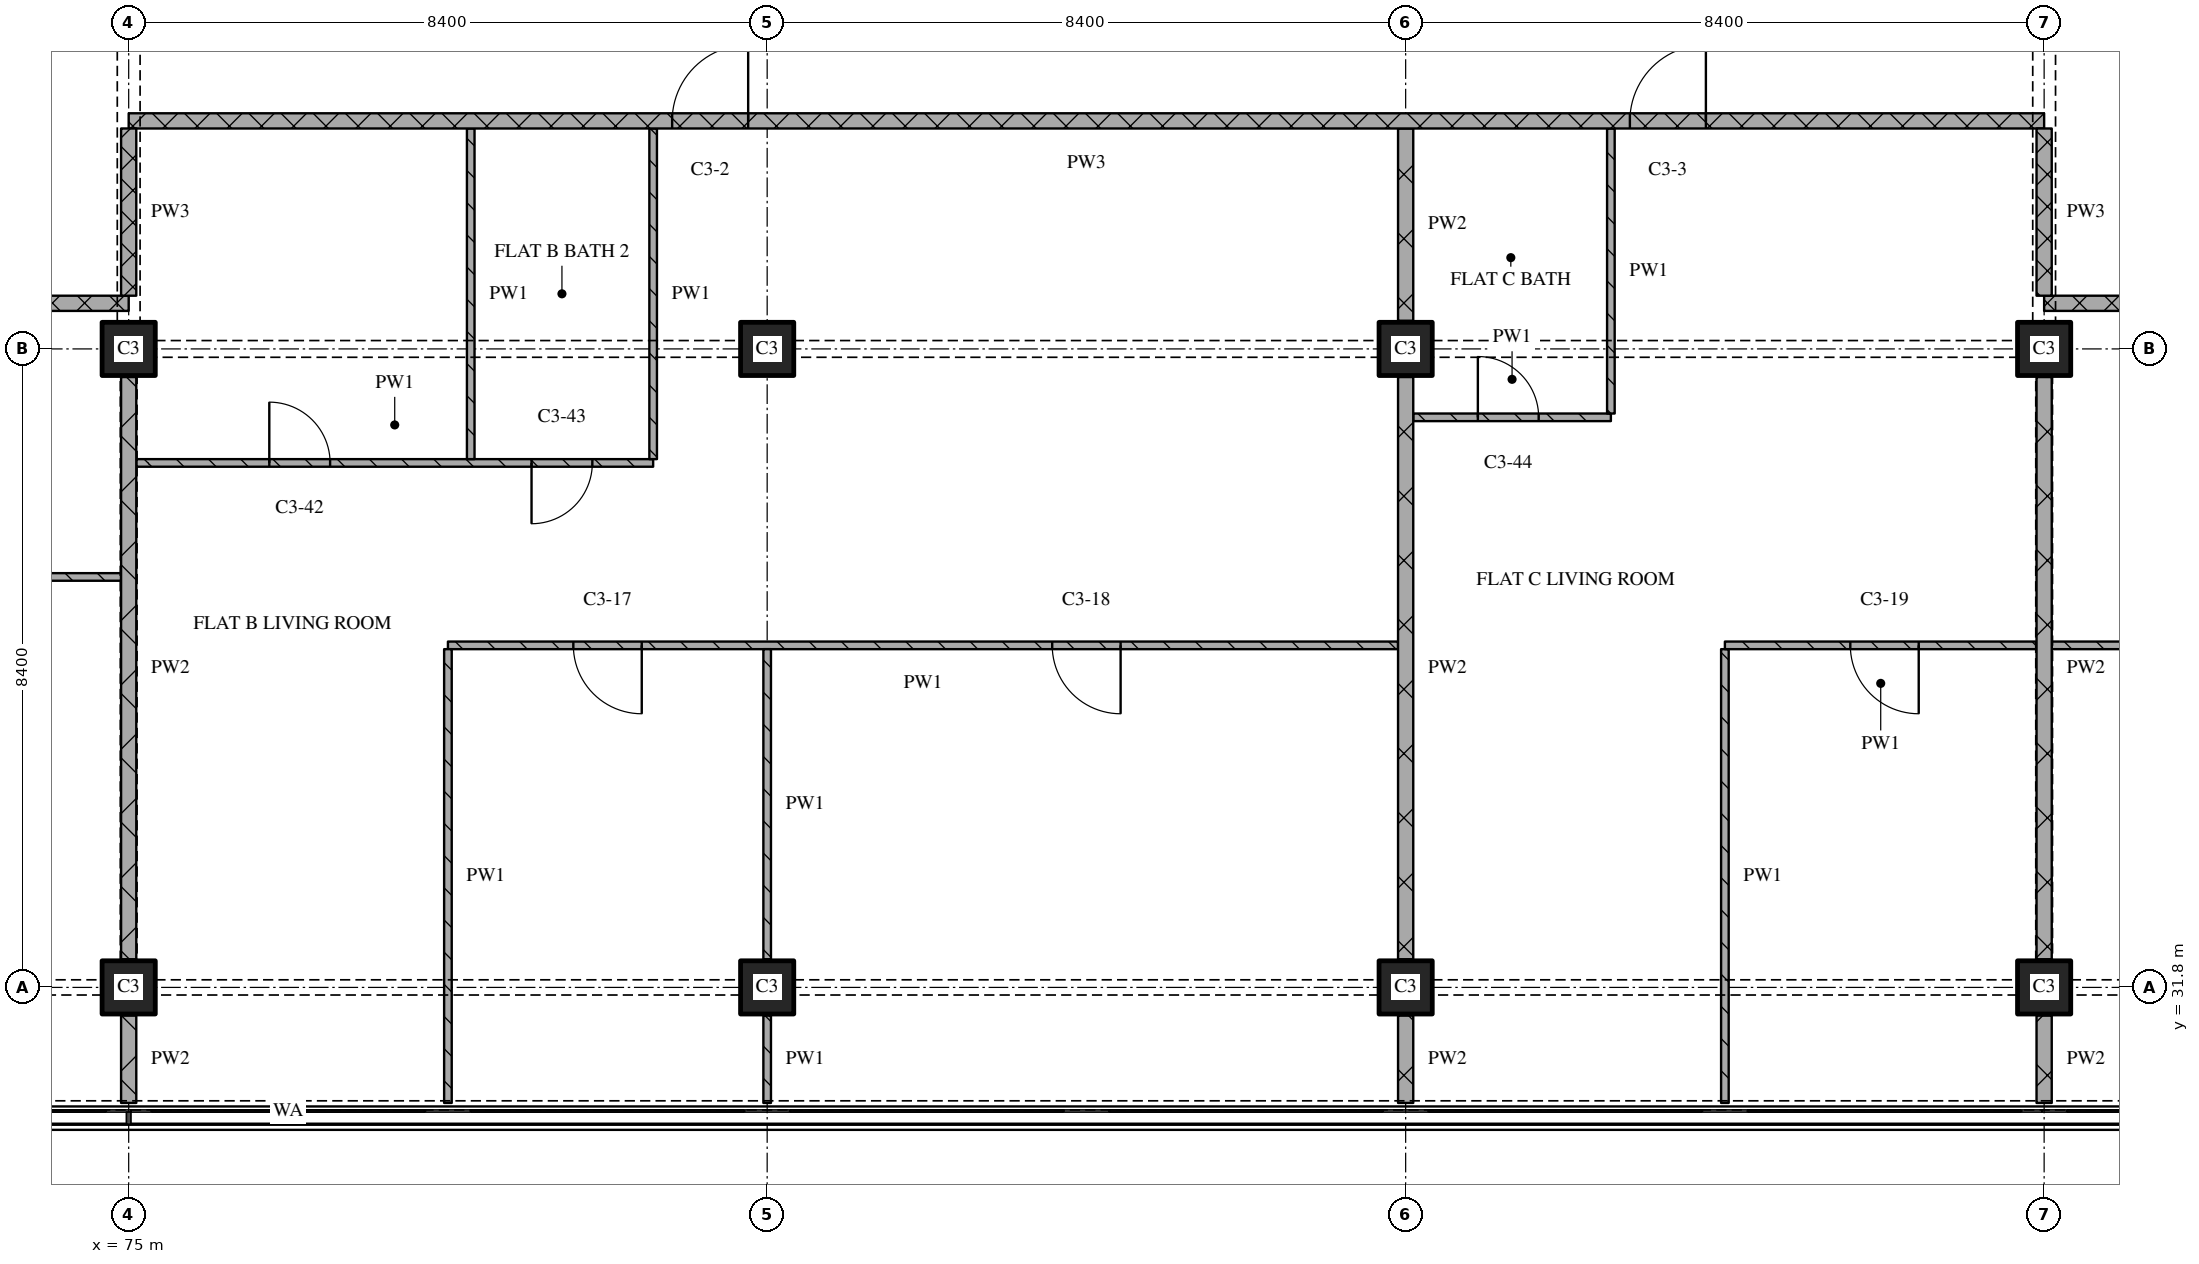
"""IFC4 building model, lengths in metres.
Left out: names, types, materials, properties, quantities, classifications, styles, units other than length and angle.
Written with IfcOpenShell. Run it as: python <this file> out.ifc"""

import sys

from ifc_helpers import new_model, si_unit, direction, frame, frame_2d, origin, origin_2d, place, context, subcontext, project, spatial, rectangle, extrude, element, fill, save


model = new_model("IFC4")
c1 = context("Model", 3, precision=1e-05, world=origin(), true_north=direction((0.0, 1.0)))
c2 = subcontext(c1, "Body", "Model", "MODEL_VIEW")
j1 = project(units=[si_unit("LENGTHUNIT", "METRE"), si_unit("PLANEANGLEUNIT", "RADIAN")], contexts=[c1])
p1 = place(None, origin())
s1 = spatial("IfcSite", under=j1, at=p1, CompositionType="ELEMENT")
p2 = place(p1, origin())
s2 = spatial("IfcBuilding", under=s1, at=p2, CompositionType="ELEMENT")
p3 = place(p2, frame((0.0, 0.0, 169.05)))
s3 = spatial("IfcBuildingStorey", under=s2, at=p3, CompositionType="ELEMENT", Elevation=169.05)
for number, where, z_axis, x_axis in (
    (1, (75.0, 31.8, 0.0), (0.0, 0.0, 1.0), (1.0, 0.0, 0.0)),
    (2, (75.0, 40.2, 0.0), (0.0, 0.0, 1.0), (1.0, 0.0, 0.0)),
    (3, (83.4, 31.8, 0.0), (0.0, 0.0, 1.0), (1.0, 0.0, 0.0)),
    (4, (83.4, 40.2, 0.0), (0.0, 0.0, 1.0), (1.0, 0.0, 0.0)),
    (5, (91.8, 31.8, 0.0), (0.0, 0.0, 1.0), (1.0, 0.0, 0.0)),
    (6, (91.8, 40.2, 0.0), (0.0, 0.0, 1.0), (1.0, 0.0, 0.0)),
    (7, (100.2, 31.8, 0.0), (0.0, 0.0, 1.0), (1.0, 0.0, 0.0)),
    (8, (100.2, 40.2, 0.0), (0.0, 0.0, 1.0), (1.0, 0.0, 0.0)),
):
    element("IfcColumn", number, at=place(p3, frame(where, z_axis=z_axis, x_axis=x_axis)), inside=s3, PredefinedType="COLUMN", context=c2, shape_type="SweptSolid", body=[
        extrude(rectangle(XDim=0.7, YDim=0.7, at=origin_2d()), origin(), (0.0, 0.0, 1.0), 3.6),
    ])
p4 = place(p3, frame((91.7, 36.3, 0.0), z_axis=(0.0, 0.0, 1.0), x_axis=(-1.0, 0.0, 0.0)))
e9 = element("IfcWall", 9, at=p4, inside=s3, PredefinedType="PARTITIONING", context=c2, shape_type="SweptSolid", body=[
    extrude(rectangle(XDim=12.5, YDim=0.1, at=frame_2d((6.25, 0.0))), origin(), (0.0, 0.0, 1.0), 3.32),
])
p5 = place(p4, frame((3.65, 0.0, 0.0)))
e10 = element("IfcOpeningElement", 10, at=p5, cuts=e9, PredefinedType="OPENING", context=c2, shape_type="SweptSolid", body=[
    extrude(rectangle(XDim=0.9, YDim=2.1, at=frame_2d((0.45, 1.05))), frame((0.0, 0.06, 0.0), z_axis=(0.0, -1.0, 0.0), x_axis=(1.0, 0.0, 0.0)), (0.0, 0.0, 1.0), 0.12),
])
p6 = place(p4, frame((9.95, 0.0, 0.0)))
e11 = element("IfcOpeningElement", 11, at=p6, cuts=e9, PredefinedType="OPENING", context=c2, shape_type="SweptSolid", body=[
    extrude(rectangle(XDim=0.9, YDim=2.1, at=frame_2d((0.45, 1.05))), frame((0.0, 0.06, 0.0), z_axis=(0.0, -1.0, 0.0), x_axis=(1.0, 0.0, 0.0)), (0.0, 0.0, 1.0), 0.12),
])
p7 = place(p3, frame((63.0, 37.2, 0.0), z_axis=(0.0, 0.0, 1.0), x_axis=(1.0, 0.0, 0.0)))
e12 = element("IfcWall", 12, at=p7, inside=s3, PredefinedType="PARTITIONING", context=c2, shape_type="SweptSolid", body=[
    extrude(rectangle(XDim=11.9, YDim=0.1, at=frame_2d((5.95, 0.0))), origin(), (0.0, 0.0, 1.0), 3.32),
])
p8 = place(p7, frame((6.35, 0.0, 0.0)))
e13 = element("IfcOpeningElement", 13, at=p8, cuts=e12, PredefinedType="OPENING", context=c2, shape_type="SweptSolid", body=[
    extrude(rectangle(XDim=0.8, YDim=2.1, at=frame_2d((0.4, 1.05))), frame((0.0, 0.06, 0.0), z_axis=(0.0, -1.0, 0.0), x_axis=(1.0, 0.0, 0.0)), (0.0, 0.0, 1.0), 0.12),
])
p9 = place(p7, frame((10.05, 0.0, 0.0)))
e14 = element("IfcOpeningElement", 14, at=p9, cuts=e12, PredefinedType="OPENING", context=c2, shape_type="SweptSolid", body=[
    extrude(rectangle(XDim=0.9, YDim=2.1, at=frame_2d((0.45, 1.05))), frame((0.0, 0.06, 0.0), z_axis=(0.0, -1.0, 0.0), x_axis=(1.0, 0.0, 0.0)), (0.0, 0.0, 1.0), 0.12),
])
p10 = place(p3, frame((75.1, 38.7, 0.0), z_axis=(0.0, 0.0, 1.0), x_axis=(1.0, 0.0, 0.0)))
e15 = element("IfcWall", 15, at=p10, inside=s3, PredefinedType="PARTITIONING", context=c2, shape_type="SweptSolid", body=[
    extrude(rectangle(XDim=6.8, YDim=0.1, at=frame_2d((3.4, 0.0))), origin(), (0.0, 0.0, 1.0), 3.32),
])
p11 = place(p10, frame((1.75, 0.0, 0.0)))
e16 = element("IfcOpeningElement", 16, at=p11, cuts=e15, PredefinedType="OPENING", context=c2, shape_type="SweptSolid", body=[
    extrude(rectangle(XDim=0.8, YDim=2.1, at=frame_2d((0.4, 1.05))), frame((0.0, 0.06, 0.0), z_axis=(0.0, -1.0, 0.0), x_axis=(1.0, 0.0, 0.0)), (0.0, 0.0, 1.0), 0.12),
])
p12 = place(p10, frame((5.2, 0.0, 0.0)))
e17 = element("IfcOpeningElement", 17, at=p12, cuts=e15, PredefinedType="OPENING", context=c2, shape_type="SweptSolid", body=[
    extrude(rectangle(XDim=0.8, YDim=2.1, at=frame_2d((0.4, 1.05))), frame((0.0, 0.06, 0.0), z_axis=(0.0, -1.0, 0.0), x_axis=(1.0, 0.0, 0.0)), (0.0, 0.0, 1.0), 0.12),
])
p13 = place(p3, frame((91.9, 39.3, 0.0), z_axis=(0.0, 0.0, 1.0), x_axis=(1.0, 0.0, 0.0)))
e18 = element("IfcWall", 18, at=p13, inside=s3, PredefinedType="PARTITIONING", context=c2, shape_type="SweptSolid", body=[
    extrude(rectangle(XDim=2.6, YDim=0.1, at=frame_2d((1.3, 0.0))), origin(), (0.0, 0.0, 1.0), 3.32),
])
p14 = place(p13, frame((0.85, 0.0, 0.0)))
e19 = element("IfcOpeningElement", 19, at=p14, cuts=e18, PredefinedType="OPENING", context=c2, shape_type="SweptSolid", body=[
    extrude(rectangle(XDim=0.8, YDim=2.1, at=frame_2d((0.4, 1.05))), frame((0.0, 0.06, 0.0), z_axis=(0.0, -1.0, 0.0), x_axis=(1.0, 0.0, 0.0)), (0.0, 0.0, 1.0), 0.12),
])
p15 = place(p3, frame((75.0, 40.8, 0.0), z_axis=(0.0, 0.0, 1.0), x_axis=(-1.0, 0.0, 0.0)))
e20 = element("IfcWall", 20, at=p15, inside=s3, PredefinedType="PARTITIONING", context=c2, shape_type="SweptSolid", body=[
    extrude(rectangle(XDim=24.28, YDim=0.2, at=frame_2d((12.14, 0.0))), origin(), (0.0, 0.0, 1.0), 3.32),
])
p16 = place(p15, frame((12.25, 0.0, 0.0)))
e21 = element("IfcOpeningElement", 21, at=p16, cuts=e20, PredefinedType="OPENING", context=c2, shape_type="SweptSolid", body=[
    extrude(rectangle(XDim=1.0, YDim=2.1, at=frame_2d((0.5, 1.05))), frame((0.0, 0.11, 0.0), z_axis=(0.0, -1.0, 0.0), x_axis=(1.0, 0.0, 0.0)), (0.0, 0.0, 1.0), 0.22),
])
p17 = place(p3, frame((124.48, 40.8, 0.0), z_axis=(0.0, 0.0, 1.0), x_axis=(-1.0, 0.0, 0.0)))
e22 = element("IfcWall", 22, at=p17, inside=s3, PredefinedType="PARTITIONING", context=c2, shape_type="SweptSolid", body=[
    extrude(rectangle(XDim=24.28, YDim=0.2, at=frame_2d((12.14, 0.0))), origin(), (0.0, 0.0, 1.0), 3.32),
])
p18 = place(p17, frame((11.93, 0.0, 0.0)))
e23 = element("IfcOpeningElement", 23, at=p18, cuts=e22, PredefinedType="OPENING", context=c2, shape_type="SweptSolid", body=[
    extrude(rectangle(XDim=1.0, YDim=2.1, at=frame_2d((0.5, 1.05))), frame((0.0, 0.11, 0.0), z_axis=(0.0, -1.0, 0.0), x_axis=(1.0, 0.0, 0.0)), (0.0, 0.0, 1.0), 0.22),
])
p19 = place(p3, frame((100.2, 43.2, 0.0), z_axis=(0.0, 0.0, 1.0), x_axis=(-1.0, 0.0, 0.0)))
e24 = element("IfcWall", 24, at=p19, inside=s3, PredefinedType="PARTITIONING", context=c2, shape_type="SweptSolid", body=[
    extrude(rectangle(XDim=25.2, YDim=0.2, at=frame_2d((12.6, 0.0))), origin(), (0.0, 0.0, 1.0), 3.32),
])
p20 = place(p19, frame((4.45, 0.0, 0.0)))
e25 = element("IfcOpeningElement", 25, at=p20, cuts=e24, PredefinedType="OPENING", context=c2, shape_type="SweptSolid", body=[
    extrude(rectangle(XDim=1.0, YDim=2.1, at=frame_2d((0.5, 1.05))), frame((0.0, 0.11, 0.0), z_axis=(0.0, -1.0, 0.0), x_axis=(1.0, 0.0, 0.0)), (0.0, 0.0, 1.0), 0.22),
])
p21 = place(p19, frame((17.05, 0.0, 0.0)))
e26 = element("IfcOpeningElement", 26, at=p21, cuts=e24, PredefinedType="OPENING", context=c2, shape_type="SweptSolid", body=[
    extrude(rectangle(XDim=1.0, YDim=2.1, at=frame_2d((0.5, 1.05))), frame((0.0, 0.11, 0.0), z_axis=(0.0, -1.0, 0.0), x_axis=(1.0, 0.0, 0.0)), (0.0, 0.0, 1.0), 0.22),
])
p22 = place(p3, frame((75.0, 43.1, 0.0), z_axis=(0.0, 0.0, 1.0), x_axis=(0.0, -1.0, 0.0)))
e27 = element("IfcWall", 27, at=p22, inside=s3, PredefinedType="PARTITIONING", context=c2, shape_type="SweptSolid", body=[
    extrude(rectangle(XDim=2.2, YDim=0.2, at=frame_2d((1.1, 0.0))), origin(), (0.0, 0.0, 1.0), 2.43),
])
p23 = place(p3, frame((75.0, 31.43, 0.0), z_axis=(0.0, 0.0, 1.0), x_axis=(0.0, -1.0, 0.0)))
e28 = element("IfcWall", 28, at=p23, inside=s3, PredefinedType="PARTITIONING", context=c2, shape_type="SweptSolid", body=[
    extrude(rectangle(XDim=1.15, YDim=0.2, at=frame_2d((0.575, 0.0))), origin(), (0.0, 0.0, 1.0), 3.32),
])
p24 = place(p3, frame((75.0, 39.83, 0.0), z_axis=(0.0, 0.0, 1.0), x_axis=(0.0, -1.0, 0.0)))
e29 = element("IfcWall", 29, at=p24, inside=s3, PredefinedType="PARTITIONING", context=c2, shape_type="SweptSolid", body=[
    extrude(rectangle(XDim=7.66, YDim=0.2, at=frame_2d((3.83, 0.0))), origin(), (0.0, 0.0, 1.0), 2.72),
])
p25 = place(p3, frame((79.2, 36.25, 0.0), z_axis=(0.0, 0.0, 1.0), x_axis=(0.0, -1.0, 0.0)))
e30 = element("IfcWall", 30, at=p25, inside=s3, PredefinedType="PARTITIONING", context=c2, shape_type="SweptSolid", body=[
    extrude(rectangle(XDim=5.97, YDim=0.1, at=frame_2d((2.985, 0.0))), origin(), (0.0, 0.0, 1.0), 3.32),
])
for number, where, z_axis, x_axis in (
    (31, (79.5, 43.1, 0.0), (0.0, 0.0, 1.0), (0.0, -1.0, 0.0)),
    (32, (81.9, 43.1, 0.0), (0.0, 0.0, 1.0), (0.0, -1.0, 0.0)),
):
    element("IfcWall", number, at=place(p3, frame(where, z_axis=z_axis, x_axis=x_axis)), inside=s3, PredefinedType="PARTITIONING", context=c2, shape_type="SweptSolid", body=[
        extrude(rectangle(XDim=4.35, YDim=0.1, at=frame_2d((2.175, 0.0))), origin(), (0.0, 0.0, 1.0), 3.32),
    ])
p26 = place(p3, frame((83.4, 31.43, 0.0), z_axis=(0.0, 0.0, 1.0), x_axis=(0.0, -1.0, 0.0)))
e33 = element("IfcWall", 33, at=p26, inside=s3, PredefinedType="PARTITIONING", context=c2, shape_type="SweptSolid", body=[
    extrude(rectangle(XDim=1.15, YDim=0.1, at=frame_2d((0.575, 0.0))), origin(), (0.0, 0.0, 1.0), 3.32),
])
p27 = place(p3, frame((83.4, 36.25, 0.0), z_axis=(0.0, 0.0, 1.0), x_axis=(0.0, -1.0, 0.0)))
e34 = element("IfcWall", 34, at=p27, inside=s3, PredefinedType="PARTITIONING", context=c2, shape_type="SweptSolid", body=[
    extrude(rectangle(XDim=4.08, YDim=0.1, at=frame_2d((2.04, 0.0))), origin(), (0.0, 0.0, 1.0), 3.32),
])
p28 = place(p3, frame((91.8, 31.43, 0.0), z_axis=(0.0, 0.0, 1.0), x_axis=(0.0, -1.0, 0.0)))
e35 = element("IfcWall", 35, at=p28, inside=s3, PredefinedType="PARTITIONING", context=c2, shape_type="SweptSolid", body=[
    extrude(rectangle(XDim=1.15, YDim=0.2, at=frame_2d((0.575, 0.0))), origin(), (0.0, 0.0, 1.0), 3.32),
])
p29 = place(p3, frame((91.8, 39.83, 0.0), z_axis=(0.0, 0.0, 1.0), x_axis=(0.0, -1.0, 0.0)))
e36 = element("IfcWall", 36, at=p29, inside=s3, PredefinedType="PARTITIONING", context=c2, shape_type="SweptSolid", body=[
    extrude(rectangle(XDim=7.66, YDim=0.2, at=frame_2d((3.83, 0.0))), origin(), (0.0, 0.0, 1.0), 3.32),
])
p30 = place(p3, frame((91.8, 43.1, 0.0), z_axis=(0.0, 0.0, 1.0), x_axis=(0.0, -1.0, 0.0)))
e37 = element("IfcWall", 37, at=p30, inside=s3, PredefinedType="PARTITIONING", context=c2, shape_type="SweptSolid", body=[
    extrude(rectangle(XDim=2.53, YDim=0.2, at=frame_2d((1.265, 0.0))), origin(), (0.0, 0.0, 1.0), 3.32),
])
p31 = place(p3, frame((94.5, 43.1, 0.0), z_axis=(0.0, 0.0, 1.0), x_axis=(0.0, -1.0, 0.0)))
e38 = element("IfcWall", 38, at=p31, inside=s3, PredefinedType="PARTITIONING", context=c2, shape_type="SweptSolid", body=[
    extrude(rectangle(XDim=3.75, YDim=0.1, at=frame_2d((1.875, 0.0))), origin(), (0.0, 0.0, 1.0), 3.32),
])
p32 = place(p3, frame((96.0, 36.25, 0.0), z_axis=(0.0, 0.0, 1.0), x_axis=(0.0, -1.0, 0.0)))
e39 = element("IfcWall", 39, at=p32, inside=s3, PredefinedType="PARTITIONING", context=c2, shape_type="SweptSolid", body=[
    extrude(rectangle(XDim=5.97, YDim=0.1, at=frame_2d((2.985, 0.0))), origin(), (0.0, 0.0, 1.0), 3.32),
])
p33 = place(p3, frame((100.2, 43.1, 0.0), z_axis=(0.0, 0.0, 1.0), x_axis=(0.0, -1.0, 0.0)))
e40 = element("IfcWall", 40, at=p33, inside=s3, PredefinedType="PARTITIONING", context=c2, shape_type="SweptSolid", body=[
    extrude(rectangle(XDim=2.2, YDim=0.2, at=frame_2d((1.1, 0.0))), origin(), (0.0, 0.0, 1.0), 2.43),
])
p34 = place(p3, frame((100.2, 31.43, 0.0), z_axis=(0.0, 0.0, 1.0), x_axis=(0.0, -1.0, 0.0)))
e41 = element("IfcWall", 41, at=p34, inside=s3, PredefinedType="PARTITIONING", context=c2, shape_type="SweptSolid", body=[
    extrude(rectangle(XDim=1.15, YDim=0.2, at=frame_2d((0.575, 0.0))), origin(), (0.0, 0.0, 1.0), 3.32),
])
p35 = place(p3, frame((100.2, 39.83, 0.0), z_axis=(0.0, 0.0, 1.0), x_axis=(0.0, -1.0, 0.0)))
e42 = element("IfcWall", 42, at=p35, inside=s3, PredefinedType="PARTITIONING", context=c2, shape_type="SweptSolid", body=[
    extrude(rectangle(XDim=7.66, YDim=0.2, at=frame_2d((3.83, 0.0))), origin(), (0.0, 0.0, 1.0), 2.72),
])
p36 = place(p3, frame((100.1, 36.3, 0.0), z_axis=(0.0, 0.0, 1.0), x_axis=(-1.0, 0.0, 0.0)))
e43 = element("IfcWall", 43, at=p36, inside=s3, PredefinedType="PARTITIONING", context=c2, shape_type="SweptSolid", body=[
    extrude(rectangle(XDim=4.1, YDim=0.1, at=frame_2d((2.05, 0.0))), origin(), (0.0, 0.0, 1.0), 3.32),
])
p37 = place(p36, frame((1.55, 0.0, 0.0)))
e44 = element("IfcOpeningElement", 44, at=p37, cuts=e43, PredefinedType="OPENING", context=c2, shape_type="SweptSolid", body=[
    extrude(rectangle(XDim=0.9, YDim=2.1, at=frame_2d((0.45, 1.05))), frame((0.0, 0.06, 0.0), z_axis=(0.0, -1.0, 0.0), x_axis=(1.0, 0.0, 0.0)), (0.0, 0.0, 1.0), 0.12),
])
p38 = place(p3, frame((100.3, 36.3, 0.0), z_axis=(0.0, 0.0, 1.0), x_axis=(1.0, 0.0, 0.0)))
e45 = element("IfcWall", 45, at=p38, inside=s3, PredefinedType="PARTITIONING", context=c2, shape_type="SweptSolid", body=[
    extrude(rectangle(XDim=11.0, YDim=0.1, at=frame_2d((5.5, 0.0))), origin(), (0.0, 0.0, 1.0), 3.32),
])
p39 = place(p38, frame((1.75, 0.0, 0.0)))
e46 = element("IfcOpeningElement", 46, at=p39, cuts=e45, PredefinedType="OPENING", context=c2, shape_type="SweptSolid", body=[
    extrude(rectangle(XDim=0.8, YDim=2.1, at=frame_2d((0.4, 1.05))), frame((0.0, 0.06, 0.0), z_axis=(0.0, -1.0, 0.0), x_axis=(1.0, 0.0, 0.0)), (0.0, 0.0, 1.0), 0.12),
])
p40 = place(p38, frame((6.25, 0.0, 0.0)))
e47 = element("IfcOpeningElement", 47, at=p40, cuts=e45, PredefinedType="OPENING", context=c2, shape_type="SweptSolid", body=[
    extrude(rectangle(XDim=0.8, YDim=2.1, at=frame_2d((0.4, 1.05))), frame((0.0, 0.06, 0.0), z_axis=(0.0, -1.0, 0.0), x_axis=(1.0, 0.0, 0.0)), (0.0, 0.0, 1.0), 0.12),
])
p41 = place(p38, frame((9.5, 0.0, 0.0)))
e48 = element("IfcOpeningElement", 48, at=p41, cuts=e45, PredefinedType="OPENING", context=c2, shape_type="SweptSolid", body=[
    extrude(rectangle(XDim=0.9, YDim=2.1, at=frame_2d((0.45, 1.05))), frame((0.0, 0.06, 0.0), z_axis=(0.0, -1.0, 0.0), x_axis=(1.0, 0.0, 0.0)), (0.0, 0.0, 1.0), 0.12),
])
p42 = place(p5, origin())
e49 = element("IfcDoor", 49, at=p42, inside=s3, OperationType="SINGLE_SWING_LEFT", PredefinedType="DOOR", context=c2, shape_type="SweptSolid", body=[
    extrude(rectangle(XDim=0.9, YDim=2.1, at=frame_2d((0.45, 1.05))), frame((0.0, 0.025, 0.0), z_axis=(0.0, -1.0, 0.0), x_axis=(1.0, 0.0, 0.0)), (0.0, 0.0, 1.0), 0.05),
])
fill(e10, e49)
p43 = place(p6, origin())
e50 = element("IfcDoor", 50, at=p43, inside=s3, OperationType="SINGLE_SWING_LEFT", PredefinedType="DOOR", context=c2, shape_type="SweptSolid", body=[
    extrude(rectangle(XDim=0.9, YDim=2.1, at=frame_2d((0.45, 1.05))), frame((0.0, 0.025, 0.0), z_axis=(0.0, -1.0, 0.0), x_axis=(1.0, 0.0, 0.0)), (0.0, 0.0, 1.0), 0.05),
])
fill(e11, e50)
p44 = place(p11, origin())
e51 = element("IfcDoor", 51, at=p44, inside=s3, OperationType="SINGLE_SWING_LEFT", PredefinedType="DOOR", context=c2, shape_type="SweptSolid", body=[
    extrude(rectangle(XDim=0.8, YDim=2.1, at=frame_2d((0.4, 1.05))), frame((0.0, 0.025, 0.0), z_axis=(0.0, -1.0, 0.0), x_axis=(1.0, 0.0, 0.0)), (0.0, 0.0, 1.0), 0.05),
])
fill(e16, e51)
p45 = place(p12, origin())
e52 = element("IfcDoor", 52, at=p45, inside=s3, OperationType="SINGLE_SWING_RIGHT", PredefinedType="DOOR", context=c2, shape_type="SweptSolid", body=[
    extrude(rectangle(XDim=0.8, YDim=2.1, at=frame_2d((0.4, 1.05))), frame((0.0, 0.025, 0.0), z_axis=(0.0, -1.0, 0.0), x_axis=(1.0, 0.0, 0.0)), (0.0, 0.0, 1.0), 0.05),
])
fill(e17, e52)
p46 = place(p14, origin())
e53 = element("IfcDoor", 53, at=p46, inside=s3, OperationType="SINGLE_SWING_LEFT", PredefinedType="DOOR", context=c2, shape_type="SweptSolid", body=[
    extrude(rectangle(XDim=0.8, YDim=2.1, at=frame_2d((0.4, 1.05))), frame((0.0, 0.025, 0.0), z_axis=(0.0, -1.0, 0.0), x_axis=(1.0, 0.0, 0.0)), (0.0, 0.0, 1.0), 0.05),
])
fill(e19, e53)
p47 = place(p20, origin())
e54 = element("IfcDoor", 54, at=p47, inside=s3, OperationType="SINGLE_SWING_RIGHT", PredefinedType="DOOR", context=c2, shape_type="SweptSolid", body=[
    extrude(rectangle(XDim=1.0, YDim=2.1, at=frame_2d((0.5, 1.05))), frame((0.0, 0.025, 0.0), z_axis=(0.0, -1.0, 0.0), x_axis=(1.0, 0.0, 0.0)), (0.0, 0.0, 1.0), 0.05),
])
fill(e25, e54)
p48 = place(p21, origin())
e55 = element("IfcDoor", 55, at=p48, inside=s3, OperationType="SINGLE_SWING_RIGHT", PredefinedType="DOOR", context=c2, shape_type="SweptSolid", body=[
    extrude(rectangle(XDim=1.0, YDim=2.1, at=frame_2d((0.5, 1.05))), frame((0.0, 0.025, 0.0), z_axis=(0.0, -1.0, 0.0), x_axis=(1.0, 0.0, 0.0)), (0.0, 0.0, 1.0), 0.05),
])
fill(e26, e55)
p49 = place(p37, origin())
e56 = element("IfcDoor", 56, at=p49, inside=s3, OperationType="SINGLE_SWING_LEFT", PredefinedType="DOOR", context=c2, shape_type="SweptSolid", body=[
    extrude(rectangle(XDim=0.9, YDim=2.1, at=frame_2d((0.45, 1.05))), frame((0.0, 0.025, 0.0), z_axis=(0.0, -1.0, 0.0), x_axis=(1.0, 0.0, 0.0)), (0.0, 0.0, 1.0), 0.05),
])
fill(e44, e56)
save(model, sys.argv[1])
